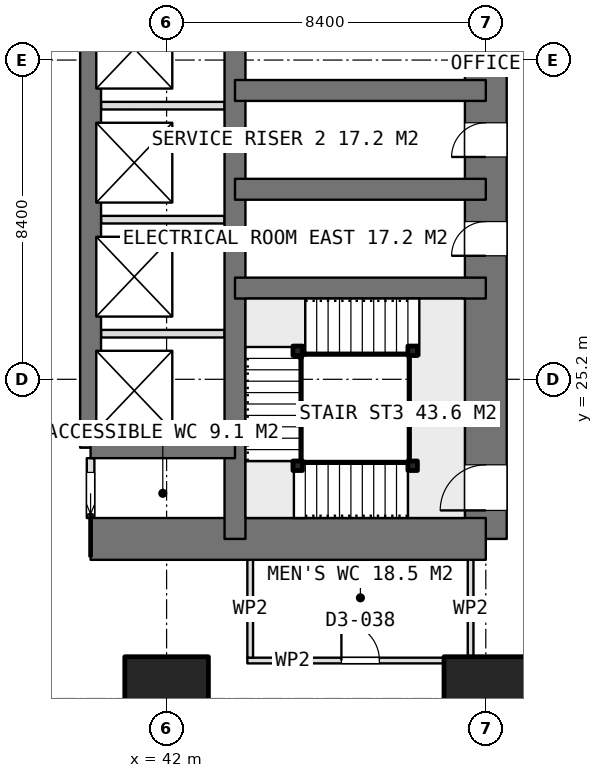
"""IFC4 building model, lengths in metres.
Left out: names, types, materials, properties, quantities, classifications, styles, units other than length and angle.
Written with IfcOpenShell. Run it as: python <this file> out.ifc"""

import sys

from ifc_helpers import new_model, si_unit, direction, frame, frame_2d, origin, origin_2d, place, context, subcontext, project, spatial, rectangle, extrude, element, fill, save


model = new_model("IFC4")
c1 = context("Model", 3, precision=1e-05, world=origin(), true_north=direction((0.0, 1.0)))
c2 = subcontext(c1, "Body", "Model", "MODEL_VIEW")
j1 = project(units=[si_unit("LENGTHUNIT", "METRE"), si_unit("PLANEANGLEUNIT", "RADIAN")], contexts=[c1])
p1 = place(None, origin())
s1 = spatial("IfcSite", under=j1, at=p1, CompositionType="ELEMENT")
p2 = place(p1, origin())
s2 = spatial("IfcBuilding", under=s1, at=p2, CompositionType="ELEMENT")
p3 = place(p2, frame((0.0, 0.0, 32.9)))
s3 = spatial("IfcBuildingStorey", under=s2, at=p3, CompositionType="ELEMENT", Elevation=32.9)
p4 = place(p3, frame((40.0, 21.0, 0.0), z_axis=(0.0, 0.0, 1.0), x_axis=(1.0, 0.0, 0.0)))
e1 = element("IfcWall", 1, at=p4, inside=s3, PredefinedType="SHEAR", context=c2, shape_type="SweptSolid", body=[
    extrude(rectangle(XDim=10.4, YDim=1.1, at=frame_2d((5.2, 0.0))), origin(), (0.0, 0.0, 1.0), 3.75),
])
p5 = place(p3, frame((50.4, 21.0, 0.0), z_axis=(0.0, 0.0, 1.0), x_axis=(0.0, 1.0, 0.0)))
e2 = element("IfcWall", 2, at=p5, inside=s3, PredefinedType="SHEAR", context=c2, shape_type="SweptSolid", body=[
    extrude(rectangle(XDim=25.2, YDim=1.1, at=frame_2d((12.6, 0.0))), origin(), (0.0, 0.0, 1.0), 3.75),
])
p6 = place(p5, frame((16.2, 0.0, 0.0)))
e3 = element("IfcOpeningElement", 3, at=p6, cuts=e2, PredefinedType="OPENING", context=c2, shape_type="SweptSolid", body=[
    extrude(rectangle(XDim=1.2, YDim=2.1, at=frame_2d((0.6, 1.05))), frame((0.0, 0.56, 0.0), z_axis=(0.0, -1.0, 0.0), x_axis=(1.0, 0.0, 0.0)), (0.0, 0.0, 1.0), 1.12),
])
p7 = place(p5, frame((10.05, 0.0, 0.0)))
e4 = element("IfcOpeningElement", 4, at=p7, cuts=e2, PredefinedType="OPENING", context=c2, shape_type="SweptSolid", body=[
    extrude(rectangle(XDim=0.9, YDim=2.1, at=frame_2d((0.45, 1.05))), frame((0.0, 0.56, 0.0), z_axis=(0.0, -1.0, 0.0), x_axis=(1.0, 0.0, 0.0)), (0.0, 0.0, 1.0), 1.12),
])
p8 = place(p5, frame((7.45, 0.0, 0.0)))
e5 = element("IfcOpeningElement", 5, at=p8, cuts=e2, PredefinedType="OPENING", context=c2, shape_type="SweptSolid", body=[
    extrude(rectangle(XDim=0.9, YDim=2.1, at=frame_2d((0.45, 1.05))), frame((0.0, 0.56, 0.0), z_axis=(0.0, -1.0, 0.0), x_axis=(1.0, 0.0, 0.0)), (0.0, 0.0, 1.0), 1.12),
])
p9 = place(p5, frame((0.75, 0.0, 0.0)))
e6 = element("IfcOpeningElement", 6, at=p9, cuts=e2, PredefinedType="OPENING", context=c2, shape_type="SweptSolid", body=[
    extrude(rectangle(XDim=1.2, YDim=2.1, at=frame_2d((0.6, 1.05))), frame((0.0, 0.56, 0.0), z_axis=(0.0, -1.0, 0.0), x_axis=(1.0, 0.0, 0.0)), (0.0, 0.0, 1.0), 1.12),
])
p10 = place(p3, frame((43.8, 21.0, 0.0), z_axis=(0.0, 0.0, 1.0), x_axis=(0.0, 1.0, 0.0)))
e7 = element("IfcWall", 7, at=p10, inside=s3, PredefinedType="SHEAR", context=c2, shape_type="SweptSolid", body=[
    extrude(rectangle(XDim=25.2, YDim=0.55, at=frame_2d((12.6, 0.0))), origin(), (0.0, 0.0, 1.0), 3.75),
])
p11 = place(p3, frame((40.0, 23.4, 0.0), z_axis=(0.0, 0.0, 1.0), x_axis=(0.0, 1.0, 0.0)))
e8 = element("IfcWall", 8, at=p11, inside=s3, PredefinedType="SHEAR", context=c2, shape_type="SweptSolid", body=[
    extrude(rectangle(XDim=18.0, YDim=0.55, at=frame_2d((9.0, 0.0))), origin(), (0.0, 0.0, 1.0), 3.75),
])
p12 = place(p3, frame((40.0, 23.4, 0.0), z_axis=(0.0, 0.0, 1.0), x_axis=(1.0, 0.0, 0.0)))
e9 = element("IfcWall", 9, at=p12, inside=s3, PredefinedType="SHEAR", context=c2, shape_type="SweptSolid", body=[
    extrude(rectangle(XDim=3.8, YDim=0.55, at=frame_2d((1.9, 0.0))), origin(), (0.0, 0.0, 1.0), 3.75),
])
for number, where, z_axis, x_axis in (
    (10, (43.8, 27.6, 0.0), (0.0, 0.0, 1.0), (1.0, 0.0, 0.0)),
    (11, (43.8, 30.2, 0.0), (0.0, 0.0, 1.0), (1.0, 0.0, 0.0)),
    (12, (43.8, 32.8, 0.0), (0.0, 0.0, 1.0), (1.0, 0.0, 0.0)),
):
    element("IfcWall", number, at=place(p3, frame(where, z_axis=z_axis, x_axis=x_axis)), inside=s3, PredefinedType="SHEAR", context=c2, shape_type="SweptSolid", body=[
        extrude(rectangle(XDim=6.6, YDim=0.55, at=frame_2d((3.3, 0.0))), origin(), (0.0, 0.0, 1.0), 3.75),
    ])
for number, where, z_axis, x_axis in (
    (13, (42.0, 16.8, 0.0), (0.0, 0.0, 1.0), (1.0, 0.0, 0.0)),
    (14, (50.4, 16.8, 0.0), (0.0, 0.0, 1.0), (1.0, 0.0, 0.0)),
):
    element("IfcColumn", number, at=place(p3, frame(where, z_axis=z_axis, x_axis=x_axis)), inside=s3, PredefinedType="COLUMN", context=c2, shape_type="SweptSolid", body=[
        extrude(rectangle(XDim=2.2, YDim=2.2, at=origin_2d()), origin(), (0.0, 0.0, 1.0), 3.75),
    ])
for number, where, z_axis, x_axis in (
    (15, (40.275, 26.4, 0.0), (0.0, 0.0, 1.0), (1.0, 0.0, 0.0)),
    (16, (40.275, 29.4, 0.0), (0.0, 0.0, 1.0), (1.0, 0.0, 0.0)),
    (17, (40.275, 32.4, 0.0), (0.0, 0.0, 1.0), (1.0, 0.0, 0.0)),
):
    element("IfcWall", number, at=place(p3, frame(where, z_axis=z_axis, x_axis=x_axis)), inside=s3, PredefinedType="PARTITIONING", context=c2, shape_type="SweptSolid", body=[
        extrude(rectangle(XDim=3.25, YDim=0.2, at=frame_2d((1.625, 0.0))), origin(), (0.0, 0.0, 1.0), 3.5),
    ])
p13 = place(p3, frame((40.0, 21.55, 0.0), z_axis=(0.0, 0.0, 1.0), x_axis=(0.0, 1.0, 0.0)))
e18 = element("IfcWall", 18, at=p13, inside=s3, PredefinedType="PARTITIONING", context=c2, shape_type="SweptSolid", body=[
    extrude(rectangle(XDim=1.575, YDim=0.2, at=frame_2d((0.788, 0.0))), origin(), (0.0, 0.0, 1.0), 3.5),
])
p14 = place(p13, frame((0.1, 0.0, 0.0)))
e19 = element("IfcOpeningElement", 19, at=p14, cuts=e18, PredefinedType="OPENING", context=c2, shape_type="SweptSolid", body=[
    extrude(rectangle(XDim=1.1, YDim=2.1, at=frame_2d((0.55, 1.05))), frame((0.0, 0.11, 0.0), z_axis=(0.0, -1.0, 0.0), x_axis=(1.0, 0.0, 0.0)), (0.0, 0.0, 1.0), 0.22),
])
p15 = place(p3, frame((44.125, 17.8, 0.0), z_axis=(0.0, 0.0, 1.0), x_axis=(1.0, 0.0, 0.0)))
e20 = element("IfcWall", 20, at=p15, inside=s3, PredefinedType="PARTITIONING", context=c2, shape_type="SweptSolid", body=[
    extrude(rectangle(XDim=5.95, YDim=0.15, at=frame_2d((2.975, 0.0))), origin(), (0.0, 0.0, 1.0), 3.5),
])
p16 = place(p15, frame((2.475, 0.0, 0.0)))
e21 = element("IfcOpeningElement", 21, at=p16, cuts=e20, PredefinedType="OPENING", context=c2, shape_type="SweptSolid", body=[
    extrude(rectangle(XDim=1.0, YDim=2.1, at=frame_2d((0.5, 1.05))), frame((0.0, 0.085, 0.0), z_axis=(0.0, -1.0, 0.0), x_axis=(1.0, 0.0, 0.0)), (0.0, 0.0, 1.0), 0.17),
])
for number, where, z_axis, x_axis in (
    (22, (44.2, 17.875, 0.0), (0.0, 0.0, 1.0), (0.0, 1.0, 0.0)),
    (23, (50.0, 17.875, 0.0), (0.0, 0.0, 1.0), (0.0, 1.0, 0.0)),
):
    element("IfcWall", number, at=place(p3, frame(where, z_axis=z_axis, x_axis=x_axis)), inside=s3, PredefinedType="PARTITIONING", context=c2, shape_type="SweptSolid", body=[
        extrude(rectangle(XDim=2.575, YDim=0.15, at=frame_2d((1.288, 0.0))), origin(), (0.0, 0.0, 1.0), 3.5),
    ])
for number, where, z_axis, x_axis in (
    (24, (48.475, 22.925, 0.0), (0.0, 0.0, 1.0), (1.0, 0.0, 0.0)),
    (25, (45.45, 22.925, 0.0), (0.0, 0.0, 1.0), (1.0, 0.0, 0.0)),
    (26, (45.45, 25.95, 0.0), (0.0, 0.0, 1.0), (1.0, 0.0, 0.0)),
    (27, (48.475, 25.95, 0.0), (0.0, 0.0, 1.0), (1.0, 0.0, 0.0)),
):
    element("IfcColumn", number, at=place(p3, frame(where, z_axis=z_axis, x_axis=x_axis)), inside=s3, PredefinedType="COLUMN", context=c2, shape_type="SweptSolid", body=[
        extrude(rectangle(XDim=0.25, YDim=0.25, at=origin_2d()), origin(), (0.0, 0.0, 1.0), 3.75),
    ])
p17 = place(p7, origin())
e28 = element("IfcDoor", 28, at=p17, inside=s3, OperationType="SINGLE_SWING_LEFT", PredefinedType="DOOR", context=c2, shape_type="SweptSolid", body=[
    extrude(rectangle(XDim=0.9, YDim=2.1, at=frame_2d((0.45, 1.05))), frame((0.0, 0.025, 0.0), z_axis=(0.0, -1.0, 0.0), x_axis=(1.0, 0.0, 0.0)), (0.0, 0.0, 1.0), 0.05),
])
fill(e4, e28)
p18 = place(p8, origin())
e29 = element("IfcDoor", 29, at=p18, inside=s3, OperationType="SINGLE_SWING_LEFT", PredefinedType="DOOR", context=c2, shape_type="SweptSolid", body=[
    extrude(rectangle(XDim=0.9, YDim=2.1, at=frame_2d((0.45, 1.05))), frame((0.0, 0.025, 0.0), z_axis=(0.0, -1.0, 0.0), x_axis=(1.0, 0.0, 0.0)), (0.0, 0.0, 1.0), 0.05),
])
fill(e5, e29)
p19 = place(p14, origin())
e30 = element("IfcDoor", 30, at=p19, inside=s3, OperationType="SLIDING_TO_LEFT", PredefinedType="DOOR", context=c2, shape_type="SweptSolid", body=[
    extrude(rectangle(XDim=1.1, YDim=2.1, at=frame_2d((0.55, 1.05))), frame((0.0, 0.025, 0.0), z_axis=(0.0, -1.0, 0.0), x_axis=(1.0, 0.0, 0.0)), (0.0, 0.0, 1.0), 0.05),
])
fill(e19, e30)
p20 = place(p16, origin())
e31 = element("IfcDoor", 31, at=p20, inside=s3, OperationType="SINGLE_SWING_LEFT", PredefinedType="DOOR", context=c2, shape_type="SweptSolid", body=[
    extrude(rectangle(XDim=1.0, YDim=2.1, at=frame_2d((0.5, 1.05))), frame((0.0, 0.025, 0.0), z_axis=(0.0, -1.0, 0.0), x_axis=(1.0, 0.0, 0.0)), (0.0, 0.0, 1.0), 0.05),
])
fill(e21, e31)
p21 = place(p9, origin())
e32 = element("IfcDoor", 32, at=p21, inside=s3, OperationType="SINGLE_SWING_RIGHT", PredefinedType="DOOR", context=c2, shape_type="SweptSolid", body=[
    extrude(rectangle(XDim=1.2, YDim=2.1, at=frame_2d((0.6, 1.05))), frame((0.0, 0.025, 0.0), z_axis=(0.0, -1.0, 0.0), x_axis=(1.0, 0.0, 0.0)), (0.0, 0.0, 1.0), 0.05),
])
fill(e6, e32)
save(model, sys.argv[1])
